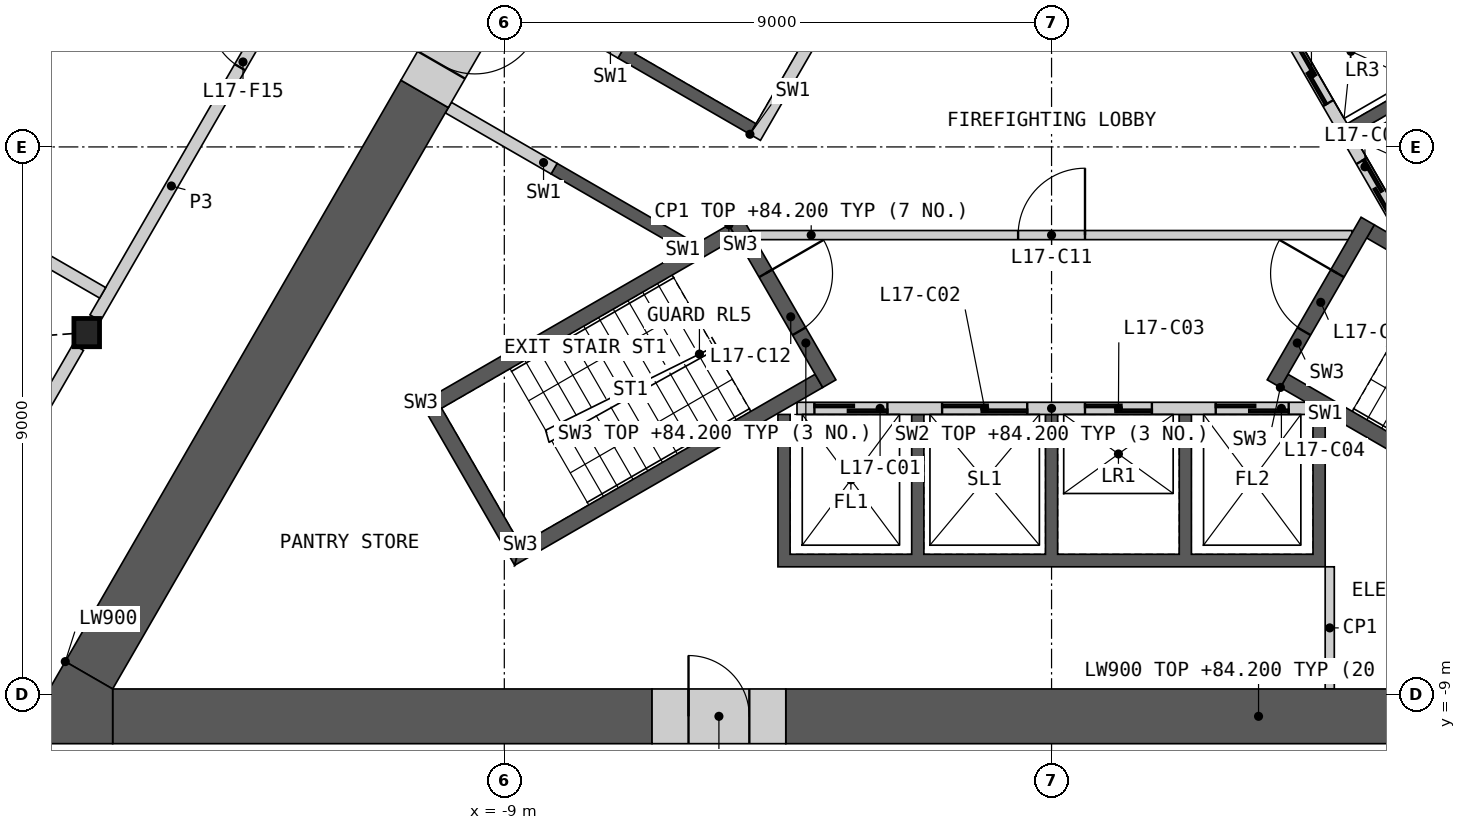
"""IFC4 building model, lengths in metres.
Left out: names, types, materials, properties, quantities, classifications, styles, units other than length and angle.
Written with IfcOpenShell. Run it as: python <this file> out.ifc"""

import sys

from ifc_helpers import new_model, si_unit, direction, frame, frame_2d, origin, origin_2d, place, context, subcontext, project, spatial, polyline, rectangle, i_section, outline, extrude, element, fill, save


model = new_model("IFC4")
c1 = context("Model", 3, precision=1e-05, world=origin(), true_north=direction((0.0, 1.0)))
c2 = subcontext(c1, "Body", "Model", "MODEL_VIEW")
j1 = project(units=[si_unit("LENGTHUNIT", "METRE"), si_unit("PLANEANGLEUNIT", "RADIAN")], contexts=[c1])
p1 = place(None, origin())
s1 = spatial("IfcSite", under=j1, at=p1, CompositionType="ELEMENT")
p2 = place(p1, origin())
s2 = spatial("IfcBuilding", under=s1, at=p2, CompositionType="ELEMENT")
p3 = place(p2, frame((0.0, 0.0, 80.4)))
s3 = spatial("IfcBuildingStorey", under=s2, at=p3, CompositionType="ELEMENT", Elevation=80.4)
p4 = place(p3, frame((-15.868, -3.054, 0.0), z_axis=(0.0, 0.0, 1.0), x_axis=(1.0, 0.0, 0.0)))
e1 = element("IfcColumn", 1, at=p4, inside=s3, PredefinedType="COLUMN", context=c2, shape_type="SweptSolid", body=[
    extrude(i_section(OverallWidth=0.421, OverallDepth=0.465, WebThickness=0.045, FlangeThickness=0.072, at=origin_2d()), origin(), (0.0, 0.0, 1.0), 4.2),
])
p5 = place(p3, origin())
e2 = element("IfcWall", 2, at=p5, inside=s3, PredefinedType="SHEAR", context=c2, shape_type="SweptSolid", body=[
    extrude(outline(polyline([(4.5, -4.4), (4.5, -6.906), (-4.5, -6.906), (-4.5, -4.4), (-4.3, -4.4), (-4.3, -6.7), (-2.3, -6.7), (-2.3, -4.4), (-2.1, -4.4), (-2.1, -6.7), (-0.1, -6.7), (-0.1, -4.4), (0.1, -4.4), (0.1, -6.7), (2.1, -6.7), (2.1, -4.4), (2.3, -4.4), (2.3, -6.7), (4.3, -6.7), (4.3, -4.4), (4.5, -4.4)])), origin(), (0.0, 0.0, 1.0), 3.8),
])
p6 = place(p3, frame((-4.187, -4.3, 0.0), z_axis=(0.0, 0.0, 1.0), x_axis=(1.0, 0.0, 0.0)))
e3 = element("IfcWall", 3, at=p6, inside=s3, PredefinedType="SOLIDWALL", context=c2, shape_type="SweptSolid", body=[
    extrude(rectangle(XDim=8.373, YDim=0.2, at=frame_2d((4.187, 0.0))), origin(), (0.0, 0.0, 1.0), 3.8),
])
p7 = place(p6, frame((0.287, 0.0, 0.0)))
e4 = element("IfcOpeningElement", 4, at=p7, cuts=e3, PredefinedType="OPENING", context=c2, shape_type="SweptSolid", body=[
    extrude(rectangle(XDim=1.2, YDim=2.1, at=frame_2d((0.6, 1.05))), frame((0.0, 0.11, 0.0), z_axis=(0.0, -1.0, 0.0), x_axis=(1.0, 0.0, 0.0)), (0.0, 0.0, 1.0), 0.22),
])
p8 = place(p6, frame((2.387, 0.0, 0.0)))
e5 = element("IfcOpeningElement", 5, at=p8, cuts=e3, PredefinedType="OPENING", context=c2, shape_type="SweptSolid", body=[
    extrude(rectangle(XDim=1.4, YDim=2.1, at=frame_2d((0.7, 1.05))), frame((0.0, 0.11, 0.0), z_axis=(0.0, -1.0, 0.0), x_axis=(1.0, 0.0, 0.0)), (0.0, 0.0, 1.0), 0.22),
])
p9 = place(p6, frame((4.737, 0.0, 0.0)))
e6 = element("IfcOpeningElement", 6, at=p9, cuts=e3, PredefinedType="OPENING", context=c2, shape_type="SweptSolid", body=[
    extrude(rectangle(XDim=1.1, YDim=2.1, at=frame_2d((0.55, 1.05))), frame((0.0, 0.11, 0.0), z_axis=(0.0, -1.0, 0.0), x_axis=(1.0, 0.0, 0.0)), (0.0, 0.0, 1.0), 0.22),
])
p10 = place(p6, frame((6.887, 0.0, 0.0)))
e7 = element("IfcOpeningElement", 7, at=p10, cuts=e3, PredefinedType="OPENING", context=c2, shape_type="SweptSolid", body=[
    extrude(rectangle(XDim=1.2, YDim=2.1, at=frame_2d((0.6, 1.05))), frame((0.0, 0.11, 0.0), z_axis=(0.0, -1.0, 0.0), x_axis=(1.0, 0.0, 0.0)), (0.0, 0.0, 1.0), 0.22),
])
p11 = place(p3, origin())
e8 = element("IfcWall", 8, at=p11, inside=s3, PredefinedType="SHEAR", context=c2, shape_type="SweptSolid", body=[
    extrude(outline(polyline([(2.66, 4.192), (4.831, 5.445), (8.231, -0.444), (6.061, -1.697), (5.96, -1.524), (7.952, -0.374), (6.952, 1.358), (4.96, 0.208), (4.861, 0.381), (6.852, 1.531), (5.852, 3.263), (3.861, 2.113), (3.76, 2.287), (5.752, 3.437), (4.752, 5.169), (2.76, 4.019), (2.66, 4.192)])), origin(), (0.0, 0.0, 1.0), 3.8),
])
p12 = place(p3, frame((5.817, -1.476, 0.0), z_axis=(0.0, 0.0, 1.0), x_axis=(-0.500002616675, 0.866023893041, 0.0)))
e9 = element("IfcWall", 9, at=p12, inside=s3, PredefinedType="SOLIDWALL", context=c2, shape_type="SweptSolid", body=[
    extrude(rectangle(XDim=8.373, YDim=0.2, at=frame_2d((4.187, 0.0))), origin(), (0.0, 0.0, 1.0), 3.8),
])
p13 = place(p12, frame((0.337, 0.0, 0.0)))
e10 = element("IfcOpeningElement", 10, at=p13, cuts=e9, PredefinedType="OPENING", context=c2, shape_type="SweptSolid", body=[
    extrude(rectangle(XDim=1.1, YDim=2.1, at=frame_2d((0.55, 1.05))), frame((0.0, 0.11, 0.0), z_axis=(0.0, -1.0, 0.0), x_axis=(1.0, 0.0, 0.0)), (0.0, 0.0, 1.0), 0.22),
])
p14 = place(p12, frame((2.537, 0.0, 0.0)))
e11 = element("IfcOpeningElement", 11, at=p14, cuts=e9, PredefinedType="OPENING", context=c2, shape_type="SweptSolid", body=[
    extrude(rectangle(XDim=1.1, YDim=2.1, at=frame_2d((0.55, 1.05))), frame((0.0, 0.11, 0.0), z_axis=(0.0, -1.0, 0.0), x_axis=(1.0, 0.0, 0.0)), (0.0, 0.0, 1.0), 0.22),
])
p15 = place(p12, frame((4.737, 0.0, 0.0)))
e12 = element("IfcOpeningElement", 12, at=p15, cuts=e9, PredefinedType="OPENING", context=c2, shape_type="SweptSolid", body=[
    extrude(rectangle(XDim=1.1, YDim=2.1, at=frame_2d((0.55, 1.05))), frame((0.0, 0.11, 0.0), z_axis=(0.0, -1.0, 0.0), x_axis=(1.0, 0.0, 0.0)), (0.0, 0.0, 1.0), 0.22),
])
p16 = place(p12, frame((7.037, 0.0, 0.0)))
e13 = element("IfcOpeningElement", 13, at=p16, cuts=e9, PredefinedType="OPENING", context=c2, shape_type="SweptSolid", body=[
    extrude(rectangle(XDim=0.9, YDim=2.1, at=frame_2d((0.45, 1.05))), frame((0.0, 0.11, 0.0), z_axis=(0.0, -1.0, 0.0), x_axis=(1.0, 0.0, 0.0)), (0.0, 0.0, 1.0), 0.22),
])
p17 = place(p3, origin())
e14 = element("IfcWall", 14, at=p17, inside=s3, PredefinedType="SHEAR", context=c2, shape_type="SweptSolid", body=[
    extrude(outline(polyline([(-6.061, -1.697), (-8.231, -0.444), (-8.131, -0.271), (-5.96, -1.524), (-6.061, -1.697)])), origin(), (0.0, 0.0, 1.0), 3.8),
])
p18 = place(p3, origin())
e15 = element("IfcWall", 15, at=p18, inside=s3, PredefinedType="SHEAR", context=c2, shape_type="SweptSolid", body=[
    extrude(outline(polyline([(-4.96, 0.208), (-7.131, 1.461), (-5.931, 3.54), (-3.76, 2.287), (-3.861, 2.113), (-5.852, 3.263), (-6.852, 1.531), (-4.861, 0.381), (-4.96, 0.208)])), origin(), (0.0, 0.0, 1.0), 3.8),
])
p19 = place(p3, frame((-1.631, 5.776, 0.0), z_axis=(0.0, 0.0, 1.0), x_axis=(-0.499992876559, -0.866029516466, 0.0)))
e16 = element("IfcWall", 16, at=p19, inside=s3, PredefinedType="SOLIDWALL", context=c2, shape_type="SweptSolid", body=[
    extrude(rectangle(XDim=6.486, YDim=0.2, at=frame_2d((3.243, 0.0))), origin(), (0.0, 0.0, 1.0), 3.8),
])
p20 = place(p19, frame((0.437, 0.0, 0.0)))
e17 = element("IfcOpeningElement", 17, at=p20, cuts=e16, PredefinedType="OPENING", context=c2, shape_type="SweptSolid", body=[
    extrude(rectangle(XDim=0.9, YDim=2.1, at=frame_2d((0.45, 1.05))), frame((0.0, 0.11, 0.0), z_axis=(0.0, -1.0, 0.0), x_axis=(1.0, 0.0, 0.0)), (0.0, 0.0, 1.0), 0.22),
])
p21 = place(p19, frame((2.637, 0.0, 0.0)))
e18 = element("IfcOpeningElement", 18, at=p21, cuts=e16, PredefinedType="OPENING", context=c2, shape_type="SweptSolid", body=[
    extrude(rectangle(XDim=0.9, YDim=2.1, at=frame_2d((0.45, 1.05))), frame((0.0, 0.11, 0.0), z_axis=(0.0, -1.0, 0.0), x_axis=(1.0, 0.0, 0.0)), (0.0, 0.0, 1.0), 0.22),
])
p22 = place(p3, frame((-7.081, 1.548, 0.0), z_axis=(0.0, 0.0, 1.0), x_axis=(-0.865983199114, 0.50007309351, 0.0)))
e19 = element("IfcWall", 19, at=p22, inside=s3, PredefinedType="SHEAR", context=c2, shape_type="SweptSolid", body=[
    extrude(rectangle(XDim=2.009, YDim=0.2, at=frame_2d((1.004, 0.0))), origin(), (0.0, 0.0, 1.0), 3.8),
])
p23 = place(p3, frame((-8.181, -0.357, 0.0), z_axis=(0.0, 0.0, 1.0), x_axis=(-0.866035824272, 0.499981950752, 0.0)))
e20 = element("IfcWall", 20, at=p23, inside=s3, PredefinedType="SHEAR", context=c2, shape_type="SweptSolid", body=[
    extrude(rectangle(XDim=2.009, YDim=0.2, at=frame_2d((1.004, 0.0))), origin(), (0.0, 0.0, 1.0), 3.8),
])
p24 = place(p3, frame((-4.941, -1.45, 0.0), z_axis=(0.0, 0.0, 1.0), x_axis=(1.0, 0.0, 0.0)))
e21 = element("IfcWall", 21, at=p24, inside=s3, PredefinedType="PARTITIONING", context=c2, shape_type="SweptSolid", body=[
    extrude(rectangle(XDim=9.882, YDim=0.15, at=frame_2d((4.941, 0.0))), origin(), (0.0, 0.0, 1.0), 3.8),
])
p25 = place(p24, frame((4.391, 0.0, 0.0)))
e22 = element("IfcOpeningElement", 22, at=p25, cuts=e21, PredefinedType="OPENING", context=c2, shape_type="SweptSolid", body=[
    extrude(rectangle(XDim=1.1, YDim=2.1, at=frame_2d((0.55, 1.05))), frame((0.0, 0.085, 0.0), z_axis=(0.0, -1.0, 0.0), x_axis=(1.0, 0.0, 0.0)), (0.0, 0.0, 1.0), 0.17),
])
p26 = place(p3, origin())
e23 = element("IfcWall", 23, at=p26, inside=s3, PredefinedType="SHEAR", context=c2, shape_type="SweptSolid", body=[
    extrude(outline(polyline([(-5.307, -1.281), (-10.374, -4.206), (-10.032, -4.298), (-5.182, -1.498), (-5.307, -1.281)])), origin(), (0.0, 0.0, 1.0), 3.8),
])
p27 = place(p3, origin())
e24 = element("IfcWall", 24, at=p27, inside=s3, PredefinedType="SHEAR", context=c2, shape_type="SweptSolid", body=[
    extrude(outline(polyline([(-10.374, -4.206), (-8.83, -6.881), (-8.738, -6.539), (-10.032, -4.298), (-10.374, -4.206)])), origin(), (0.0, 0.0, 1.0), 3.8),
])
p28 = place(p3, origin())
e25 = element("IfcWall", 25, at=p28, inside=s3, PredefinedType="SHEAR", context=c2, shape_type="SweptSolid", body=[
    extrude(outline(polyline([(-8.738, -6.539), (-8.83, -6.881), (-3.763, -3.956), (-3.888, -3.739), (-8.738, -6.539)])), origin(), (0.0, 0.0, 1.0), 3.8),
])
p29 = place(p3, frame((-5.199, -1.219, 0.0), z_axis=(0.0, 0.0, 1.0), x_axis=(0.499982516597, -0.866035497597, 0.0)))
e26 = element("IfcWall", 26, at=p29, inside=s3, PredefinedType="SHEAR", context=c2, shape_type="SweptSolid", body=[
    extrude(rectangle(XDim=3.088, YDim=0.25, at=frame_2d((1.544, 0.0))), origin(), (0.0, 0.0, 1.0), 3.8),
])
p30 = place(p29, frame((0.994, 0.0, 0.0)))
e27 = element("IfcOpeningElement", 27, at=p30, cuts=e26, PredefinedType="OPENING", context=c2, shape_type="SweptSolid", body=[
    extrude(rectangle(XDim=1.1, YDim=2.1, at=frame_2d((0.55, 1.05))), frame((0.0, 0.135, 0.0), z_axis=(0.0, -1.0, 0.0), x_axis=(1.0, 0.0, 0.0)), (0.0, 0.0, 1.0), 0.27),
])
p31 = place(p3, origin())
e28 = element("IfcWall", 28, at=p31, inside=s3, PredefinedType="SHEAR", context=c2, shape_type="SweptSolid", body=[
    extrude(outline(polyline([(3.763, -3.956), (8.83, -6.881), (8.738, -6.539), (3.888, -3.739), (3.763, -3.956)])), origin(), (0.0, 0.0, 1.0), 3.8),
])
p32 = place(p3, origin())
e29 = element("IfcWall", 29, at=p32, inside=s3, PredefinedType="SHEAR", context=c2, shape_type="SweptSolid", body=[
    extrude(outline(polyline([(10.032, -4.298), (10.374, -4.206), (5.307, -1.281), (5.182, -1.498), (10.032, -4.298)])), origin(), (0.0, 0.0, 1.0), 3.8),
])
p33 = place(p3, frame((3.655, -3.893, 0.0), z_axis=(0.0, 0.0, 1.0), x_axis=(0.499982516597, 0.866035497597, 0.0)))
e30 = element("IfcWall", 30, at=p33, inside=s3, PredefinedType="SHEAR", context=c2, shape_type="SweptSolid", body=[
    extrude(rectangle(XDim=3.088, YDim=0.25, at=frame_2d((1.544, 0.0))), origin(), (0.0, 0.0, 1.0), 3.8),
])
p34 = place(p33, frame((0.994, 0.0, 0.0)))
e31 = element("IfcOpeningElement", 31, at=p34, cuts=e30, PredefinedType="OPENING", context=c2, shape_type="SweptSolid", body=[
    extrude(rectangle(XDim=1.1, YDim=2.1, at=frame_2d((0.55, 1.05))), frame((0.0, 0.135, 0.0), z_axis=(0.0, -1.0, 0.0), x_axis=(1.0, 0.0, 0.0)), (0.0, 0.0, 1.0), 0.27),
])
p35 = place(p3, frame((4.575, -6.906, 0.0), z_axis=(0.0, 0.0, 1.0), x_axis=(0.0, -1.0, 0.0)))
e32 = element("IfcWall", 32, at=p35, inside=s3, PredefinedType="PARTITIONING", context=c2, shape_type="SweptSolid", body=[
    extrude(rectangle(XDim=2.009, YDim=0.15, at=frame_2d((1.004, 0.0))), origin(), (0.0, 0.0, 1.0), 3.8),
])
p36 = place(p3, frame((-4.371, -9.365, 0.0), z_axis=(0.0, 0.0, 1.0), x_axis=(1.0, 0.0, 0.0)))
e33 = element("IfcWall", 33, at=p36, inside=s3, PredefinedType="SHEAR", context=c2, shape_type="SweptSolid", body=[
    extrude(rectangle(XDim=15.55, YDim=0.9, at=frame_2d((7.775, 0.0))), origin(), (0.0, 0.0, 1.0), 3.8),
])
p37 = place(p3, frame((-15.441, -9.365, 0.0), z_axis=(0.0, 0.0, 1.0), x_axis=(1.0, 0.0, 0.0)))
e34 = element("IfcWall", 34, at=p37, inside=s3, PredefinedType="SHEAR", context=c2, shape_type="SweptSolid", body=[
    extrude(rectangle(XDim=8.871, YDim=0.9, at=frame_2d((4.435, 0.0))), origin(), (0.0, 0.0, 1.0), 3.8),
])
p38 = place(p3, frame((-10.31, 0.872, 0.0), z_axis=(0.0, 0.0, 1.0), x_axis=(-0.499991697393, -0.866030197244, 0.0)))
e35 = element("IfcWall", 35, at=p38, inside=s3, PredefinedType="SHEAR", context=c2, shape_type="SweptSolid", body=[
    extrude(rectangle(XDim=11.041, YDim=0.9, at=frame_2d((5.521, 0.0))), origin(), (0.0, 0.0, 1.0), 3.8),
])
p39 = place(p3, origin())
e36 = element("IfcWall", 36, at=p39, inside=s3, PredefinedType="SHEAR", context=c2, shape_type="SweptSolid", body=[
    extrude(outline(polyline([(-16.221, -8.465), (-15.441, -8.915), (-15.441, -9.815), (-17.0, -9.815), (-16.221, -8.465)])), origin(), (0.0, 0.0, 1.0), 3.8),
])
p40 = place(p3, frame((-6.571, -9.365, 0.0), z_axis=(0.0, 0.0, 1.0), x_axis=(1.0, 0.0, 0.0)))
e37 = element("IfcWall", 37, at=p40, inside=s3, PredefinedType="SHEAR", context=c2, shape_type="SweptSolid", body=[
    extrude(rectangle(XDim=2.2, YDim=0.9, at=frame_2d((1.1, 0.0))), origin(), (0.0, 0.0, 1.0), 3.8),
])
p41 = place(p40, frame((0.6, 0.0, 0.0)))
e38 = element("IfcOpeningElement", 38, at=p41, cuts=e37, PredefinedType="OPENING", context=c2, shape_type="SweptSolid", body=[
    extrude(rectangle(XDim=1.0, YDim=2.1, at=frame_2d((0.5, 1.05))), frame((0.0, 0.46, 0.0), z_axis=(0.0, -1.0, 0.0), x_axis=(1.0, 0.0, 0.0)), (0.0, 0.0, 1.0), 0.92),
])
p42 = place(p3, frame((-9.21, 2.777, 0.0), z_axis=(0.0, 0.0, 1.0), x_axis=(-0.500077893725, -0.86598042715, 0.0)))
e39 = element("IfcWall", 39, at=p42, inside=s3, PredefinedType="SHEAR", context=c2, shape_type="SweptSolid", body=[
    extrude(rectangle(XDim=2.2, YDim=0.9, at=frame_2d((1.1, 0.0))), origin(), (0.0, 0.0, 1.0), 3.8),
])
p43 = place(p42, frame((0.55, 0.0, 0.0)))
e40 = element("IfcOpeningElement", 40, at=p43, cuts=e39, PredefinedType="OPENING", context=c2, shape_type="SweptSolid", body=[
    extrude(rectangle(XDim=1.1, YDim=2.1, at=frame_2d((0.55, 1.05))), frame((0.0, 0.46, 0.0), z_axis=(0.0, -1.0, 0.0), x_axis=(1.0, 0.0, 0.0)), (0.0, 0.0, 1.0), 0.92),
])
p44 = place(p3, frame((-15.728, -2.811, 0.0), z_axis=(0.0, 0.0, 1.0), x_axis=(0.49999175339, 0.866030164915, 0.0)))
e41 = element("IfcWall", 41, at=p44, inside=s3, PredefinedType="PARTITIONING", context=c2, shape_type="SweptSolid", body=[
    extrude(rectangle(XDim=10.019, YDim=0.2, at=frame_2d((5.009, 0.0))), origin(), (0.0, 0.0, 1.0), 3.8),
])
p45 = place(p44, frame((4.76, 0.0, 0.0)))
e42 = element("IfcOpeningElement", 42, at=p45, cuts=e41, PredefinedType="OPENING", context=c2, shape_type="SweptSolid", body=[
    extrude(rectangle(XDim=1.0, YDim=2.1, at=frame_2d((0.5, 1.05))), frame((0.0, 0.11, 0.0), z_axis=(0.0, -1.0, 0.0), x_axis=(1.0, 0.0, 0.0)), (0.0, 0.0, 1.0), 0.22),
])
p46 = place(p3, frame((-19.244, -8.902, 0.0), z_axis=(0.0, 0.0, 1.0), x_axis=(0.499984737558, 0.86603421538, 0.0)))
e43 = element("IfcWall", 43, at=p46, inside=s3, PredefinedType="PARTITIONING", context=c2, shape_type="SweptSolid", body=[
    extrude(rectangle(XDim=6.473, YDim=0.2, at=frame_2d((3.236, 0.0))), origin(), (0.0, 0.0, 1.0), 3.8),
])
p47 = place(p46, frame((2.787, 0.0, 0.0)))
e44 = element("IfcOpeningElement", 44, at=p47, cuts=e43, PredefinedType="OPENING", context=c2, shape_type="SweptSolid", body=[
    extrude(rectangle(XDim=1.0, YDim=2.1, at=frame_2d((0.5, 1.05))), frame((0.0, 0.11, 0.0), z_axis=(0.0, -1.0, 0.0), x_axis=(1.0, 0.0, 0.0)), (0.0, 0.0, 1.0), 0.22),
])
p48 = place(p3, frame((-26.913, 4.129, 0.0), z_axis=(0.0, 0.0, 1.0), x_axis=(0.866026475891, -0.499998143053, 0.0)))
e45 = element("IfcWall", 45, at=p48, inside=s3, PredefinedType="PARTITIONING", context=c2, shape_type="SweptSolid", body=[
    extrude(rectangle(XDim=13.057, YDim=0.2, at=frame_2d((6.529, 0.0))), origin(), (0.0, 0.0, 1.0), 2.885),
])
p49 = place(p7, origin())
e46 = element("IfcDoor", 46, at=p49, inside=s3, OperationType="SLIDING_TO_LEFT", PredefinedType="DOOR", context=c2, shape_type="SweptSolid", body=[
    extrude(rectangle(XDim=1.2, YDim=2.1, at=frame_2d((0.6, 1.05))), frame((0.0, 0.025, 0.0), z_axis=(0.0, -1.0, 0.0), x_axis=(1.0, 0.0, 0.0)), (0.0, 0.0, 1.0), 0.05),
])
fill(e4, e46)
p50 = place(p8, origin())
e47 = element("IfcDoor", 47, at=p50, inside=s3, OperationType="SLIDING_TO_LEFT", PredefinedType="DOOR", context=c2, shape_type="SweptSolid", body=[
    extrude(rectangle(XDim=1.4, YDim=2.1, at=frame_2d((0.7, 1.05))), frame((0.0, 0.025, 0.0), z_axis=(0.0, -1.0, 0.0), x_axis=(1.0, 0.0, 0.0)), (0.0, 0.0, 1.0), 0.05),
])
fill(e5, e47)
p51 = place(p9, origin())
e48 = element("IfcDoor", 48, at=p51, inside=s3, OperationType="SLIDING_TO_LEFT", PredefinedType="DOOR", context=c2, shape_type="SweptSolid", body=[
    extrude(rectangle(XDim=1.1, YDim=2.1, at=frame_2d((0.55, 1.05))), frame((0.0, 0.025, 0.0), z_axis=(0.0, -1.0, 0.0), x_axis=(1.0, 0.0, 0.0)), (0.0, 0.0, 1.0), 0.05),
])
fill(e6, e48)
p52 = place(p10, origin())
e49 = element("IfcDoor", 49, at=p52, inside=s3, OperationType="SLIDING_TO_LEFT", PredefinedType="DOOR", context=c2, shape_type="SweptSolid", body=[
    extrude(rectangle(XDim=1.2, YDim=2.1, at=frame_2d((0.6, 1.05))), frame((0.0, 0.025, 0.0), z_axis=(0.0, -1.0, 0.0), x_axis=(1.0, 0.0, 0.0)), (0.0, 0.0, 1.0), 0.05),
])
fill(e7, e49)
p53 = place(p13, origin())
e50 = element("IfcDoor", 50, at=p53, inside=s3, OperationType="SLIDING_TO_LEFT", PredefinedType="DOOR", context=c2, shape_type="SweptSolid", body=[
    extrude(rectangle(XDim=1.1, YDim=2.1, at=frame_2d((0.55, 1.05))), frame((0.0, 0.025, 0.0), z_axis=(0.0, -1.0, 0.0), x_axis=(1.0, 0.0, 0.0)), (0.0, 0.0, 1.0), 0.05),
])
fill(e10, e50)
p54 = place(p14, origin())
e51 = element("IfcDoor", 51, at=p54, inside=s3, OperationType="SLIDING_TO_LEFT", PredefinedType="DOOR", context=c2, shape_type="SweptSolid", body=[
    extrude(rectangle(XDim=1.1, YDim=2.1, at=frame_2d((0.55, 1.05))), frame((0.0, 0.025, 0.0), z_axis=(0.0, -1.0, 0.0), x_axis=(1.0, 0.0, 0.0)), (0.0, 0.0, 1.0), 0.05),
])
fill(e11, e51)
p55 = place(p25, origin())
e52 = element("IfcDoor", 52, at=p55, inside=s3, OperationType="SINGLE_SWING_RIGHT", PredefinedType="DOOR", context=c2, shape_type="SweptSolid", body=[
    extrude(rectangle(XDim=1.1, YDim=2.1, at=frame_2d((0.55, 1.05))), frame((0.0, 0.025, 0.0), z_axis=(0.0, -1.0, 0.0), x_axis=(1.0, 0.0, 0.0)), (0.0, 0.0, 1.0), 0.05),
])
fill(e22, e52)
p56 = place(p30, origin())
e53 = element("IfcDoor", 53, at=p56, inside=s3, OperationType="SINGLE_SWING_LEFT", PredefinedType="DOOR", context=c2, shape_type="SweptSolid", body=[
    extrude(rectangle(XDim=1.1, YDim=2.1, at=frame_2d((0.55, 1.05))), frame((0.0, 0.025, 0.0), z_axis=(0.0, -1.0, 0.0), x_axis=(1.0, 0.0, 0.0)), (0.0, 0.0, 1.0), 0.05),
])
fill(e27, e53)
p57 = place(p34, origin())
e54 = element("IfcDoor", 54, at=p57, inside=s3, OperationType="SINGLE_SWING_RIGHT", PredefinedType="DOOR", context=c2, shape_type="SweptSolid", body=[
    extrude(rectangle(XDim=1.1, YDim=2.1, at=frame_2d((0.55, 1.05))), frame((0.0, 0.025, 0.0), z_axis=(0.0, -1.0, 0.0), x_axis=(1.0, 0.0, 0.0)), (0.0, 0.0, 1.0), 0.05),
])
fill(e31, e54)
p58 = place(p41, origin())
e55 = element("IfcDoor", 55, at=p58, inside=s3, OperationType="SINGLE_SWING_LEFT", PredefinedType="DOOR", context=c2, shape_type="SweptSolid", body=[
    extrude(rectangle(XDim=1.0, YDim=2.1, at=frame_2d((0.5, 1.05))), frame((0.0, 0.205, 0.0), z_axis=(0.0, -1.0, 0.0), x_axis=(1.0, 0.0, 0.0)), (0.0, 0.0, 1.0), 0.05),
])
fill(e38, e55)
p59 = place(p43, origin())
e56 = element("IfcDoor", 56, at=p59, inside=s3, OperationType="SINGLE_SWING_LEFT", PredefinedType="DOOR", context=c2, shape_type="SweptSolid", body=[
    extrude(rectangle(XDim=1.1, YDim=2.1, at=frame_2d((0.55, 1.05))), frame((0.0, 0.205, 0.0), z_axis=(0.0, -1.0, 0.0), x_axis=(1.0, 0.0, 0.0)), (0.0, 0.0, 1.0), 0.05),
])
fill(e40, e56)
p60 = place(p45, origin())
e57 = element("IfcDoor", 57, at=p60, inside=s3, OperationType="SINGLE_SWING_RIGHT", PredefinedType="DOOR", context=c2, shape_type="SweptSolid", body=[
    extrude(rectangle(XDim=1.0, YDim=2.1, at=frame_2d((0.5, 1.05))), frame((0.0, 0.025, 0.0), z_axis=(0.0, -1.0, 0.0), x_axis=(1.0, 0.0, 0.0)), (0.0, 0.0, 1.0), 0.05),
])
fill(e42, e57)
save(model, sys.argv[1])
